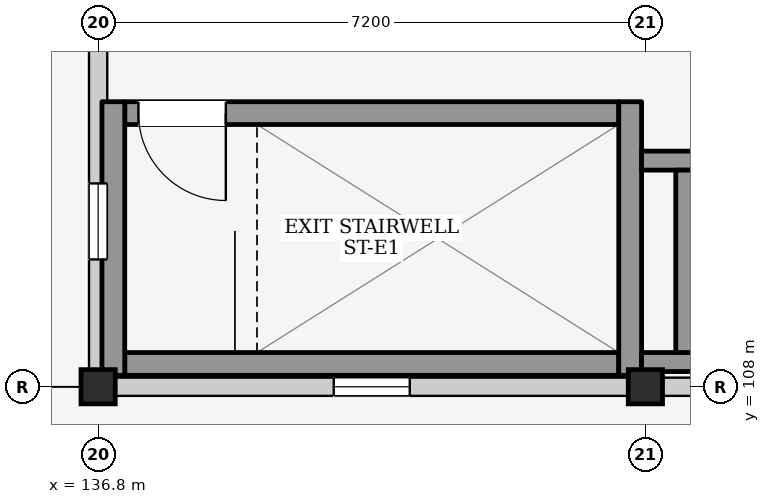
"""IFC4 building model, lengths in metres.
Left out: names, types, materials, properties, quantities, classifications, styles, units other than length and angle.
Written with IfcOpenShell. Run it as: python <this file> out.ifc"""

import sys

from ifc_helpers import new_model, si_unit, direction, frame, frame_2d, origin, origin_2d, place, context, subcontext, project, spatial, rectangle, extrude, element, fill, save


model = new_model("IFC4")
c1 = context("Model", 3, precision=1e-05, world=origin(), true_north=direction((0.0, 1.0)))
c2 = subcontext(c1, "Body", "Model", "MODEL_VIEW")
j1 = project(units=[si_unit("LENGTHUNIT", "METRE"), si_unit("PLANEANGLEUNIT", "RADIAN")], contexts=[c1])
p1 = place(None, origin())
s1 = spatial("IfcSite", under=j1, at=p1, CompositionType="ELEMENT")
p2 = place(p1, origin())
s2 = spatial("IfcBuilding", under=s1, at=p2, CompositionType="ELEMENT")
p3 = place(p2, frame((0.0, 0.0, 41.2)))
s3 = spatial("IfcBuildingStorey", under=s2, at=p3, CompositionType="ELEMENT", Elevation=41.2)
for number, where, z_axis, x_axis in (
    (1, (136.8, 108.0, 0.0), (0.0, 0.0, 1.0), (1.0, 0.0, 0.0)),
    (2, (144.0, 108.0, 0.0), (0.0, 0.0, 1.0), (1.0, 0.0, 0.0)),
):
    element("IfcColumn", number, at=place(p3, frame(where, z_axis=z_axis, x_axis=x_axis)), inside=s3, PredefinedType="COLUMN", context=c2, shape_type="SweptSolid", body=[
        extrude(rectangle(XDim=0.45, YDim=0.45, at=origin_2d()), origin(), (0.0, 0.0, 1.0), 3.2),
    ])
p4 = place(p3, frame((137.025, 108.0, 0.0), z_axis=(0.0, 0.0, 1.0), x_axis=(1.0, 0.0, 0.0)))
e3 = element("IfcWall", 3, at=p4, inside=s3, PredefinedType="ELEMENTEDWALL", context=c2, shape_type="SweptSolid", body=[
    extrude(rectangle(XDim=6.75, YDim=0.24, at=frame_2d((3.375, 0.0))), origin(), (0.0, 0.0, 1.0), 2.345),
])
p5 = place(p4, frame((2.875, 0.0, 1.2)))
e4 = element("IfcOpeningElement", 4, at=p5, cuts=e3, PredefinedType="OPENING", context=c2, shape_type="SweptSolid", body=[
    extrude(rectangle(XDim=1.0, YDim=0.9, at=frame_2d((0.5, 0.45))), frame((0.0, 0.135, 0.0), z_axis=(0.0, -1.0, 0.0), x_axis=(1.0, 0.0, 0.0)), (0.0, 0.0, 1.0), 0.27),
])
p6 = place(p3, frame((136.8, 108.225, 0.0), z_axis=(0.0, 0.0, 1.0), x_axis=(0.0, 1.0, 0.0)))
e5 = element("IfcWall", 5, at=p6, inside=s3, PredefinedType="ELEMENTEDWALL", context=c2, shape_type="SweptSolid", body=[
    extrude(rectangle(XDim=6.75, YDim=0.24, at=frame_2d((3.375, 0.0))), origin(), (0.0, 0.0, 1.0), 2.445),
])
p7 = place(p6, frame((1.45, 0.0, 1.2)))
e6 = element("IfcOpeningElement", 6, at=p7, cuts=e5, PredefinedType="OPENING", context=c2, shape_type="SweptSolid", body=[
    extrude(rectangle(XDim=1.0, YDim=0.9, at=frame_2d((0.5, 0.45))), frame((0.0, 0.135, 0.0), z_axis=(0.0, -1.0, 0.0), x_axis=(1.0, 0.0, 0.0)), (0.0, 0.0, 1.0), 0.27),
])
p8 = place(p3, frame((144.225, 108.0, 0.0), z_axis=(0.0, 0.0, 1.0), x_axis=(1.0, 0.0, 0.0)))
e7 = element("IfcWall", 7, at=p8, inside=s3, PredefinedType="ELEMENTEDWALL", context=c2, shape_type="SweptSolid", body=[
    extrude(rectangle(XDim=6.75, YDim=0.24, at=frame_2d((3.375, 0.0))), origin(), (0.0, 0.0, 1.0), 2.345),
])
p9 = place(p8, frame((2.875, 0.0, 1.2)))
e8 = element("IfcOpeningElement", 8, at=p9, cuts=e7, PredefinedType="OPENING", context=c2, shape_type="SweptSolid", body=[
    extrude(rectangle(XDim=1.0, YDim=0.9, at=frame_2d((0.5, 0.45))), frame((0.0, 0.135, 0.0), z_axis=(0.0, -1.0, 0.0), x_axis=(1.0, 0.0, 0.0)), (0.0, 0.0, 1.0), 0.27),
])
p10 = place(p3, frame((137.15, 108.3, 0.0), z_axis=(0.0, 0.0, 1.0), x_axis=(1.0, 0.0, 0.0)))
e9 = element("IfcWall", 9, at=p10, inside=s3, PredefinedType="SHEAR", context=c2, shape_type="SweptSolid", body=[
    extrude(rectangle(XDim=6.5, YDim=0.3, at=frame_2d((3.25, 0.0))), origin(), (0.0, 0.0, 1.0), 2.95),
])
p11 = place(p3, frame((137.15, 111.6, 0.0), z_axis=(0.0, 0.0, 1.0), x_axis=(1.0, 0.0, 0.0)))
e10 = element("IfcWall", 10, at=p11, inside=s3, PredefinedType="SHEAR", context=c2, shape_type="SweptSolid", body=[
    extrude(rectangle(XDim=6.5, YDim=0.3, at=frame_2d((3.25, 0.0))), origin(), (0.0, 0.0, 1.0), 2.95),
])
p12 = place(p11, frame((0.18, 0.0, 0.0)))
e11 = element("IfcOpeningElement", 11, at=p12, cuts=e10, PredefinedType="OPENING", context=c2, shape_type="SweptSolid", body=[
    extrude(rectangle(XDim=1.15, YDim=2.2, at=frame_2d((0.575, 1.1))), frame((0.0, 0.165, 0.0), z_axis=(0.0, -1.0, 0.0), x_axis=(1.0, 0.0, 0.0)), (0.0, 0.0, 1.0), 0.33),
])
for number, where, z_axis, x_axis in (
    (12, (137.0, 108.15, 0.0), (0.0, 0.0, 1.0), (0.0, 1.0, 0.0)),
    (13, (143.8, 108.15, 0.0), (0.0, 0.0, 1.0), (0.0, 1.0, 0.0)),
):
    element("IfcWall", number, at=place(p3, frame(where, z_axis=z_axis, x_axis=x_axis)), inside=s3, PredefinedType="SHEAR", context=c2, shape_type="SweptSolid", body=[
        extrude(rectangle(XDim=3.6, YDim=0.3, at=frame_2d((1.8, 0.0))), origin(), (0.0, 0.0, 1.0), 2.95),
    ])
p13 = place(p3, frame((143.95, 108.325, 0.0), z_axis=(0.0, 0.0, 1.0), x_axis=(1.0, 0.0, 0.0)))
e14 = element("IfcWall", 14, at=p13, inside=s3, PredefinedType="SHEAR", context=c2, shape_type="SweptSolid", body=[
    extrude(rectangle(XDim=2.675, YDim=0.25, at=frame_2d((1.337, 0.0))), origin(), (0.0, 0.0, 1.0), 2.95),
])
p14 = place(p3, frame((143.95, 110.975, 0.0), z_axis=(0.0, 0.0, 1.0), x_axis=(1.0, 0.0, 0.0)))
e15 = element("IfcWall", 15, at=p14, inside=s3, PredefinedType="SHEAR", context=c2, shape_type="SweptSolid", body=[
    extrude(rectangle(XDim=2.675, YDim=0.25, at=frame_2d((1.337, 0.0))), origin(), (0.0, 0.0, 1.0), 2.95),
])
p15 = place(p14, frame((1.0, 0.0, 0.0)))
e16 = element("IfcOpeningElement", 16, at=p15, cuts=e15, PredefinedType="OPENING", context=c2, shape_type="SweptSolid", body=[
    extrude(rectangle(XDim=1.2, YDim=2.25, at=frame_2d((0.6, 1.125))), frame((0.0, 0.14, 0.0), z_axis=(0.0, -1.0, 0.0), x_axis=(1.0, 0.0, 0.0)), (0.0, 0.0, 1.0), 0.28),
])
p16 = place(p3, frame((144.525, 108.45, 0.0), z_axis=(0.0, 0.0, 1.0), x_axis=(0.0, 1.0, 0.0)))
e17 = element("IfcWall", 17, at=p16, inside=s3, PredefinedType="SHEAR", context=c2, shape_type="SweptSolid", body=[
    extrude(rectangle(XDim=2.4, YDim=0.25, at=frame_2d((1.2, 0.0))), origin(), (0.0, 0.0, 1.0), 2.95),
])
p17 = place(p5, origin())
e18 = element("IfcWindow", 18, at=p17, inside=s3, PartitioningType="SINGLE_PANEL", PredefinedType="WINDOW", context=c2, shape_type="SweptSolid", body=[
    extrude(rectangle(XDim=1.0, YDim=0.9, at=frame_2d((0.5, 0.45))), frame((0.0, 0.03, 0.0), z_axis=(0.0, -1.0, 0.0), x_axis=(1.0, 0.0, 0.0)), (0.0, 0.0, 1.0), 0.06),
])
fill(e4, e18)
p18 = place(p7, origin())
e19 = element("IfcWindow", 19, at=p18, inside=s3, PartitioningType="SINGLE_PANEL", PredefinedType="WINDOW", context=c2, shape_type="SweptSolid", body=[
    extrude(rectangle(XDim=1.0, YDim=0.9, at=frame_2d((0.5, 0.45))), frame((0.0, 0.03, 0.0), z_axis=(0.0, -1.0, 0.0), x_axis=(1.0, 0.0, 0.0)), (0.0, 0.0, 1.0), 0.06),
])
fill(e6, e19)
p19 = place(p12, frame((1.15, 0.0, 0.0), z_axis=(0.0, 0.0, 1.0), x_axis=(-1.0, 0.0, 0.0)))
e20 = element("IfcDoor", 20, at=p19, inside=s3, OperationType="SINGLE_SWING_LEFT", PredefinedType="DOOR", context=c2, shape_type="SweptSolid", body=[
    extrude(rectangle(XDim=1.15, YDim=2.2, at=frame_2d((0.575, 1.1))), frame((0.0, 0.025, 0.0), z_axis=(0.0, -1.0, 0.0), x_axis=(1.0, 0.0, 0.0)), (0.0, 0.0, 1.0), 0.05),
])
fill(e11, e20)
save(model, sys.argv[1])
